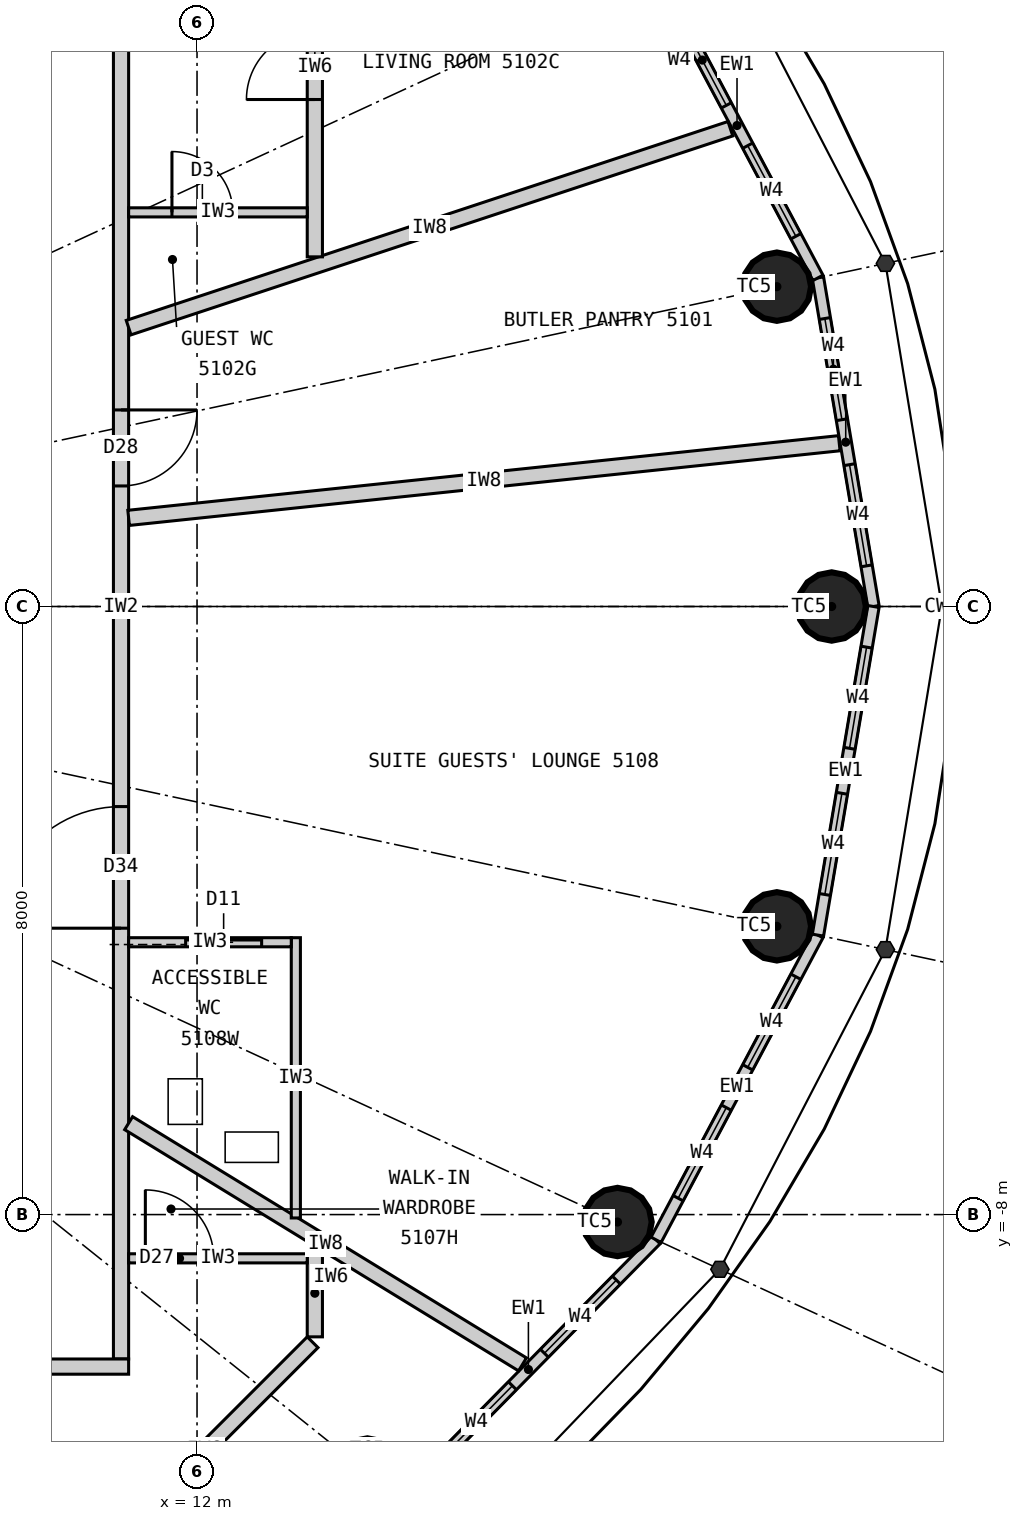
"""IFC4 building model, lengths in metres.
Left out: names, types, materials, properties, quantities, classifications, styles, units other than length and angle.
Written with IfcOpenShell. Run it as: python <this file> out.ifc"""

import sys

from ifc_helpers import new_model, si_unit, direction, frame, frame_2d, origin, origin_2d, place, context, subcontext, project, spatial, rectangle, circle, extrude, element, fill, save


model = new_model("IFC4")
c1 = context("Model", 3, precision=1e-05, world=origin(), true_north=direction((0.0, 1.0)))
c2 = subcontext(c1, "Body", "Model", "MODEL_VIEW")
j1 = project(units=[si_unit("LENGTHUNIT", "METRE"), si_unit("PLANEANGLEUNIT", "RADIAN")], contexts=[c1])
p1 = place(None, origin())
s1 = spatial("IfcSite", under=j1, at=p1, CompositionType="ELEMENT")
p2 = place(p1, origin())
s2 = spatial("IfcBuilding", under=s1, at=p2, CompositionType="ELEMENT")
p3 = place(p2, frame((0.0, 0.0, 192.9)))
s3 = spatial("IfcBuildingStorey", under=s2, at=p3, CompositionType="ELEMENT", Elevation=192.9)
for number, where, z_axis, x_axis in (
    (1, (20.35, 0.0, 0.0), (0.0, 0.0, 1.0), (1.0, 0.0, 0.0)),
    (2, (19.629, 4.208, 0.0), (0.0, 0.0, 1.0), (1.0, 0.0, 0.0)),
    (3, (14.241, -11.393, 0.0), (0.0, 0.0, 1.0), (1.0, 0.0, 0.0)),
    (4, (17.532, -8.098, 0.0), (0.0, 0.0, 1.0), (1.0, 0.0, 0.0)),
    (5, (19.629, -4.208, 0.0), (0.0, 0.0, 1.0), (1.0, 0.0, 0.0)),
):
    element("IfcColumn", number, at=place(p3, frame(where, z_axis=z_axis, x_axis=x_axis)), inside=s3, PredefinedType="COLUMN", context=c2, shape_type="SweptSolid", body=[
        extrude(circle(Radius=0.45, at=origin_2d()), origin(), (0.0, 0.0, 1.0), 3.3),
    ])
p4 = place(p3, frame((20.9, 0.0, 0.0), z_axis=(0.0, 0.0, 1.0), x_axis=(-0.166538513568, 0.986034950445, 0.0)))
e6 = element("IfcWall", 6, at=p4, inside=s3, PredefinedType="ELEMENTEDWALL", context=c2, shape_type="SweptSolid", body=[
    extrude(rectangle(XDim=4.385, YDim=0.15, at=frame_2d((2.192, 0.0))), origin(), (0.0, 0.0, 1.0), 3.12),
])
p5 = place(p4, frame((0.542, 0.0, 0.9)))
e7 = element("IfcOpeningElement", 7, at=p5, cuts=e6, PredefinedType="OPENING", context=c2, shape_type="SweptSolid", body=[
    extrude(rectangle(XDim=1.35, YDim=1.9, at=frame_2d((0.675, 0.95))), frame((0.0, 0.085, 0.0), z_axis=(0.0, -1.0, 0.0), x_axis=(1.0, 0.0, 0.0)), (0.0, 0.0, 1.0), 0.17),
])
p6 = place(p4, frame((2.492, 0.0, 0.9)))
e8 = element("IfcOpeningElement", 8, at=p6, cuts=e6, PredefinedType="OPENING", context=c2, shape_type="SweptSolid", body=[
    extrude(rectangle(XDim=1.35, YDim=1.9, at=frame_2d((0.675, 0.95))), frame((0.0, 0.085, 0.0), z_axis=(0.0, -1.0, 0.0), x_axis=(1.0, 0.0, 0.0)), (0.0, 0.0, 1.0), 0.17),
])
p7 = place(p3, frame((20.17, 4.323, 0.0), z_axis=(0.0, 0.0, 1.0), x_axis=(-0.469256152955, 0.883062094597, 0.0)))
e9 = element("IfcWall", 9, at=p7, inside=s3, PredefinedType="ELEMENTEDWALL", context=c2, shape_type="SweptSolid", body=[
    extrude(rectangle(XDim=4.539, YDim=0.15, at=frame_2d((2.27, 0.0))), origin(), (0.0, 0.0, 1.0), 3.12),
])
p8 = place(p7, frame((0.62, 0.0, 0.9)))
e10 = element("IfcOpeningElement", 10, at=p8, cuts=e9, PredefinedType="OPENING", context=c2, shape_type="SweptSolid", body=[
    extrude(rectangle(XDim=1.35, YDim=1.9, at=frame_2d((0.675, 0.95))), frame((0.0, 0.085, 0.0), z_axis=(0.0, -1.0, 0.0), x_axis=(1.0, 0.0, 0.0)), (0.0, 0.0, 1.0), 0.17),
])
p9 = place(p7, frame((2.57, 0.0, 0.9)))
e11 = element("IfcOpeningElement", 11, at=p9, cuts=e9, PredefinedType="OPENING", context=c2, shape_type="SweptSolid", body=[
    extrude(rectangle(XDim=1.35, YDim=1.9, at=frame_2d((0.675, 0.95))), frame((0.0, 0.085, 0.0), z_axis=(0.0, -1.0, 0.0), x_axis=(1.0, 0.0, 0.0)), (0.0, 0.0, 1.0), 0.17),
])
p10 = place(p3, frame((14.68, -11.744, 0.0), z_axis=(0.0, 0.0, 1.0), x_axis=(0.701527379618, 0.712642501993, 0.0)))
e12 = element("IfcWall", 12, at=p10, inside=s3, PredefinedType="ELEMENTEDWALL", context=c2, shape_type="SweptSolid", body=[
    extrude(rectangle(XDim=4.788, YDim=0.15, at=frame_2d((2.394, 0.0))), origin(), (0.0, 0.0, 1.0), 3.12),
])
p11 = place(p10, frame((0.744, 0.0, 0.9)))
e13 = element("IfcOpeningElement", 13, at=p11, cuts=e12, PredefinedType="OPENING", context=c2, shape_type="SweptSolid", body=[
    extrude(rectangle(XDim=1.35, YDim=1.9, at=frame_2d((0.675, 0.95))), frame((0.0, 0.085, 0.0), z_axis=(0.0, -1.0, 0.0), x_axis=(1.0, 0.0, 0.0)), (0.0, 0.0, 1.0), 0.17),
])
p12 = place(p10, frame((2.694, 0.0, 0.9)))
e14 = element("IfcOpeningElement", 14, at=p12, cuts=e12, PredefinedType="OPENING", context=c2, shape_type="SweptSolid", body=[
    extrude(rectangle(XDim=1.35, YDim=1.9, at=frame_2d((0.675, 0.95))), frame((0.0, 0.085, 0.0), z_axis=(0.0, -1.0, 0.0), x_axis=(1.0, 0.0, 0.0)), (0.0, 0.0, 1.0), 0.17),
])
p13 = place(p3, frame((18.04, -8.332, 0.0), z_axis=(0.0, 0.0, 1.0), x_axis=(0.469256152955, 0.883062094597, 0.0)))
e15 = element("IfcWall", 15, at=p13, inside=s3, PredefinedType="ELEMENTEDWALL", context=c2, shape_type="SweptSolid", body=[
    extrude(rectangle(XDim=4.539, YDim=0.15, at=frame_2d((2.27, 0.0))), origin(), (0.0, 0.0, 1.0), 3.12),
])
p14 = place(p13, frame((0.62, 0.0, 0.9)))
e16 = element("IfcOpeningElement", 16, at=p14, cuts=e15, PredefinedType="OPENING", context=c2, shape_type="SweptSolid", body=[
    extrude(rectangle(XDim=1.35, YDim=1.9, at=frame_2d((0.675, 0.95))), frame((0.0, 0.085, 0.0), z_axis=(0.0, -1.0, 0.0), x_axis=(1.0, 0.0, 0.0)), (0.0, 0.0, 1.0), 0.17),
])
p15 = place(p13, frame((2.57, 0.0, 0.9)))
e17 = element("IfcOpeningElement", 17, at=p15, cuts=e15, PredefinedType="OPENING", context=c2, shape_type="SweptSolid", body=[
    extrude(rectangle(XDim=1.35, YDim=1.9, at=frame_2d((0.675, 0.95))), frame((0.0, 0.085, 0.0), z_axis=(0.0, -1.0, 0.0), x_axis=(1.0, 0.0, 0.0)), (0.0, 0.0, 1.0), 0.17),
])
p16 = place(p3, frame((20.17, -4.323, 0.0), z_axis=(0.0, 0.0, 1.0), x_axis=(0.166538513568, 0.986034950445, 0.0)))
e18 = element("IfcWall", 18, at=p16, inside=s3, PredefinedType="ELEMENTEDWALL", context=c2, shape_type="SweptSolid", body=[
    extrude(rectangle(XDim=4.385, YDim=0.15, at=frame_2d((2.192, 0.0))), origin(), (0.0, 0.0, 1.0), 3.12),
])
p17 = place(p16, frame((0.542, 0.0, 0.9)))
e19 = element("IfcOpeningElement", 19, at=p17, cuts=e18, PredefinedType="OPENING", context=c2, shape_type="SweptSolid", body=[
    extrude(rectangle(XDim=1.35, YDim=1.9, at=frame_2d((0.675, 0.95))), frame((0.0, 0.085, 0.0), z_axis=(0.0, -1.0, 0.0), x_axis=(1.0, 0.0, 0.0)), (0.0, 0.0, 1.0), 0.17),
])
p18 = place(p16, frame((2.492, 0.0, 0.9)))
e20 = element("IfcOpeningElement", 20, at=p18, cuts=e18, PredefinedType="OPENING", context=c2, shape_type="SweptSolid", body=[
    extrude(rectangle(XDim=1.35, YDim=1.9, at=frame_2d((0.675, 0.95))), frame((0.0, 0.085, 0.0), z_axis=(0.0, -1.0, 0.0), x_axis=(1.0, 0.0, 0.0)), (0.0, 0.0, 1.0), 0.17),
])
p19 = place(p3, frame((11.0, -9.9, 0.0), z_axis=(0.0, 0.0, 1.0), x_axis=(0.0, 1.0, 0.0)))
e21 = element("IfcWall", 21, at=p19, inside=s3, PredefinedType="PARTITIONING", context=c2, shape_type="SweptSolid", body=[
    extrude(rectangle(XDim=19.8, YDim=0.2, at=frame_2d((9.9, 0.0))), origin(), (0.0, 0.0, 1.0), 3.12),
])
p20 = place(p19, frame((11.486, 0.0, 0.0)))
e22 = element("IfcOpeningElement", 22, at=p20, cuts=e21, PredefinedType="OPENING", context=c2, shape_type="SweptSolid", body=[
    extrude(rectangle(XDim=1.0, YDim=2.2, at=frame_2d((0.5, 1.1))), frame((0.0, 0.11, 0.0), z_axis=(0.0, -1.0, 0.0), x_axis=(1.0, 0.0, 0.0)), (0.0, 0.0, 1.0), 0.22),
])
p21 = place(p19, frame((18.645, 0.0, 0.0)))
e23 = element("IfcOpeningElement", 23, at=p21, cuts=e21, PredefinedType="OPENING", context=c2, shape_type="SweptSolid", body=[
    extrude(rectangle(XDim=1.0, YDim=2.2, at=frame_2d((0.5, 1.1))), frame((0.0, 0.11, 0.0), z_axis=(0.0, -1.0, 0.0), x_axis=(1.0, 0.0, 0.0)), (0.0, 0.0, 1.0), 0.22),
])
p22 = place(p19, frame((5.668, 0.0, 0.0)))
e24 = element("IfcOpeningElement", 24, at=p22, cuts=e21, PredefinedType="OPENING", context=c2, shape_type="SweptSolid", body=[
    extrude(rectangle(XDim=1.6, YDim=2.2, at=frame_2d((0.8, 1.1))), frame((0.0, 0.11, 0.0), z_axis=(0.0, -1.0, 0.0), x_axis=(1.0, 0.0, 0.0)), (0.0, 0.0, 1.0), 0.22),
])
p23 = place(p3, frame((11.1, -10.0, 0.0), z_axis=(0.0, 0.0, 1.0), x_axis=(-1.0, 0.0, 0.0)))
e25 = element("IfcWall", 25, at=p23, inside=s3, PredefinedType="PARTITIONING", context=c2, shape_type="SweptSolid", body=[
    extrude(rectangle(XDim=22.2, YDim=0.2, at=frame_2d((11.1, 0.0))), origin(), (0.0, 0.0, 1.0), 3.12),
])
p24 = place(p23, frame((18.864, 0.0, 0.0)))
e26 = element("IfcOpeningElement", 26, at=p24, cuts=e25, PredefinedType="OPENING", context=c2, shape_type="SweptSolid", body=[
    extrude(rectangle(XDim=1.0, YDim=2.2, at=frame_2d((0.5, 1.1))), frame((0.0, 0.11, 0.0), z_axis=(0.0, -1.0, 0.0), x_axis=(1.0, 0.0, 0.0)), (0.0, 0.0, 1.0), 0.22),
])
p25 = place(p23, frame((2.309, 0.0, 0.0)))
e27 = element("IfcOpeningElement", 27, at=p25, cuts=e25, PredefinedType="OPENING", context=c2, shape_type="SweptSolid", body=[
    extrude(rectangle(XDim=1.0, YDim=2.2, at=frame_2d((0.5, 1.1))), frame((0.0, 0.11, 0.0), z_axis=(0.0, -1.0, 0.0), x_axis=(1.0, 0.0, 0.0)), (0.0, 0.0, 1.0), 0.22),
])
p26 = place(p3, frame((11.1, 1.166, 0.0), z_axis=(0.0, 0.0, 1.0), x_axis=(0.994527487125, 0.104475247564, 0.0)))
e28 = element("IfcWall", 28, at=p26, inside=s3, PredefinedType="PARTITIONING", context=c2, shape_type="SweptSolid", body=[
    extrude(rectangle(XDim=9.401, YDim=0.2, at=frame_2d((4.701, 0.0))), origin(), (0.0, 0.0, 1.0), 2.37),
])
p27 = place(p3, frame((11.1, 3.669, 0.0), z_axis=(0.0, 0.0, 1.0), x_axis=(0.949476668397, 0.313837627079, 0.0)))
e29 = element("IfcWall", 29, at=p27, inside=s3, PredefinedType="PARTITIONING", context=c2, shape_type="SweptSolid", body=[
    extrude(rectangle(XDim=8.339, YDim=0.2, at=frame_2d((4.169, 0.0))), origin(), (0.0, 0.0, 1.0), 3.12),
])
p28 = place(p3, frame((11.1, -6.797, 0.0), z_axis=(0.0, 0.0, 1.0), x_axis=(0.852799818179, -0.522237943963, 0.0)))
e30 = element("IfcWall", 30, at=p28, inside=s3, PredefinedType="PARTITIONING", context=c2, shape_type="SweptSolid", body=[
    extrude(rectangle(XDim=6.077, YDim=0.2, at=frame_2d((3.039, 0.0))), origin(), (0.0, 0.0, 1.0), 3.12),
])
p29 = place(p3, frame((13.55, 4.6, 0.0), z_axis=(0.0, 0.0, 1.0), x_axis=(0.0, 1.0, 0.0)))
e31 = element("IfcWall", 31, at=p29, inside=s3, PredefinedType="PARTITIONING", context=c2, shape_type="SweptSolid", body=[
    extrude(rectangle(XDim=5.009, YDim=0.2, at=frame_2d((2.504, 0.0))), origin(), (0.0, 0.0, 1.0), 3.12),
])
p30 = place(p29, frame((2.07, 0.0, 0.0)))
e32 = element("IfcOpeningElement", 32, at=p30, cuts=e31, PredefinedType="OPENING", context=c2, shape_type="SweptSolid", body=[
    extrude(rectangle(XDim=0.9, YDim=2.1, at=frame_2d((0.45, 1.05))), frame((0.0, 0.11, 0.0), z_axis=(0.0, -1.0, 0.0), x_axis=(1.0, 0.0, 0.0)), (0.0, 0.0, 1.0), 0.22),
])
p31 = place(p3, frame((11.1, 5.185, 0.0), z_axis=(0.0, 0.0, 1.0), x_axis=(1.0, 0.0, 0.0)))
e33 = element("IfcWall", 33, at=p31, inside=s3, PredefinedType="PARTITIONING", context=c2, shape_type="SweptSolid", body=[
    extrude(rectangle(XDim=2.35, YDim=0.12, at=frame_2d((1.175, 0.0))), origin(), (0.0, 0.0, 1.0), 3.12),
])
p32 = place(p31, frame((0.57, 0.0, 0.0)))
e34 = element("IfcOpeningElement", 34, at=p32, cuts=e33, PredefinedType="OPENING", context=c2, shape_type="SweptSolid", body=[
    extrude(rectangle(XDim=0.8, YDim=2.1, at=frame_2d((0.4, 1.05))), frame((0.0, 0.07, 0.0), z_axis=(0.0, -1.0, 0.0), x_axis=(1.0, 0.0, 0.0)), (0.0, 0.0, 1.0), 0.14),
])
p33 = place(p3, frame((10.679, -12.521, 0.0), z_axis=(0.0, 0.0, 1.0), x_axis=(0.707106781187, 0.707106781187, 0.0)))
e35 = element("IfcWall", 35, at=p33, inside=s3, PredefinedType="PARTITIONING", context=c2, shape_type="SweptSolid", body=[
    extrude(rectangle(XDim=4.019, YDim=0.2, at=frame_2d((2.009, 0.0))), origin(), (0.0, 0.0, 1.0), 3.12),
])
p34 = place(p3, frame((13.55, -9.609, 0.0), z_axis=(0.0, 0.0, 1.0), x_axis=(0.0, 1.0, 0.0)))
e36 = element("IfcWall", 36, at=p34, inside=s3, PredefinedType="PARTITIONING", context=c2, shape_type="SweptSolid", body=[
    extrude(rectangle(XDim=1.148, YDim=0.2, at=frame_2d((0.574, 0.0))), origin(), (0.0, 0.0, 1.0), 3.12),
])
p35 = place(p3, frame((11.1, -8.576, 0.0), z_axis=(0.0, 0.0, 1.0), x_axis=(1.0, 0.0, 0.0)))
e37 = element("IfcWall", 37, at=p35, inside=s3, PredefinedType="PARTITIONING", context=c2, shape_type="SweptSolid", body=[
    extrude(rectangle(XDim=2.35, YDim=0.12, at=frame_2d((1.175, 0.0))), origin(), (0.0, 0.0, 1.0), 3.12),
])
p36 = place(p35, frame((0.22, 0.0, 0.0)))
e38 = element("IfcOpeningElement", 38, at=p36, cuts=e37, PredefinedType="OPENING", context=c2, shape_type="SweptSolid", body=[
    extrude(rectangle(XDim=0.9, YDim=2.1, at=frame_2d((0.45, 1.05))), frame((0.0, 0.07, 0.0), z_axis=(0.0, -1.0, 0.0), x_axis=(1.0, 0.0, 0.0)), (0.0, 0.0, 1.0), 0.14),
])
p37 = place(p3, frame((13.3, -8.044, 0.0), z_axis=(0.0, 0.0, 1.0), x_axis=(0.0, 1.0, 0.0)))
e39 = element("IfcWall", 39, at=p37, inside=s3, PredefinedType="PARTITIONING", context=c2, shape_type="SweptSolid", body=[
    extrude(rectangle(XDim=3.687, YDim=0.12, at=frame_2d((1.844, 0.0))), origin(), (0.0, 0.0, 1.0), 3.12),
])
p38 = place(p3, frame((11.1, -4.417, 0.0), z_axis=(0.0, 0.0, 1.0), x_axis=(1.0, 0.0, 0.0)))
e40 = element("IfcWall", 40, at=p38, inside=s3, PredefinedType="PARTITIONING", context=c2, shape_type="SweptSolid", body=[
    extrude(rectangle(XDim=2.14, YDim=0.12, at=frame_2d((1.07, 0.0))), origin(), (0.0, 0.0, 1.0), 2.37),
])
p39 = place(p38, frame((0.75, 0.0, 0.0)))
e41 = element("IfcOpeningElement", 41, at=p39, cuts=e40, PredefinedType="OPENING", context=c2, shape_type="SweptSolid", body=[
    extrude(rectangle(XDim=1.0, YDim=2.2, at=frame_2d((0.5, 1.1))), frame((0.0, 0.07, 0.0), z_axis=(0.0, -1.0, 0.0), x_axis=(1.0, 0.0, 0.0)), (0.0, 0.0, 1.0), 0.14),
])
p40 = place(p5, origin())
e42 = element("IfcWindow", 42, at=p40, inside=s3, PartitioningType="SINGLE_PANEL", PredefinedType="WINDOW", context=c2, shape_type="SweptSolid", body=[
    extrude(rectangle(XDim=1.35, YDim=1.9, at=frame_2d((0.675, 0.95))), frame((0.0, 0.03, 0.0), z_axis=(0.0, -1.0, 0.0), x_axis=(1.0, 0.0, 0.0)), (0.0, 0.0, 1.0), 0.06),
])
fill(e7, e42)
p41 = place(p6, origin())
e43 = element("IfcWindow", 43, at=p41, inside=s3, PartitioningType="SINGLE_PANEL", PredefinedType="WINDOW", context=c2, shape_type="SweptSolid", body=[
    extrude(rectangle(XDim=1.35, YDim=1.9, at=frame_2d((0.675, 0.95))), frame((0.0, 0.03, 0.0), z_axis=(0.0, -1.0, 0.0), x_axis=(1.0, 0.0, 0.0)), (0.0, 0.0, 1.0), 0.06),
])
fill(e8, e43)
p42 = place(p8, origin())
e44 = element("IfcWindow", 44, at=p42, inside=s3, PartitioningType="SINGLE_PANEL", PredefinedType="WINDOW", context=c2, shape_type="SweptSolid", body=[
    extrude(rectangle(XDim=1.35, YDim=1.9, at=frame_2d((0.675, 0.95))), frame((0.0, 0.03, 0.0), z_axis=(0.0, -1.0, 0.0), x_axis=(1.0, 0.0, 0.0)), (0.0, 0.0, 1.0), 0.06),
])
fill(e10, e44)
p43 = place(p9, origin())
e45 = element("IfcWindow", 45, at=p43, inside=s3, PartitioningType="SINGLE_PANEL", PredefinedType="WINDOW", context=c2, shape_type="SweptSolid", body=[
    extrude(rectangle(XDim=1.35, YDim=1.9, at=frame_2d((0.675, 0.95))), frame((0.0, 0.03, 0.0), z_axis=(0.0, -1.0, 0.0), x_axis=(1.0, 0.0, 0.0)), (0.0, 0.0, 1.0), 0.06),
])
fill(e11, e45)
p44 = place(p11, origin())
e46 = element("IfcWindow", 46, at=p44, inside=s3, PartitioningType="SINGLE_PANEL", PredefinedType="WINDOW", context=c2, shape_type="SweptSolid", body=[
    extrude(rectangle(XDim=1.35, YDim=1.9, at=frame_2d((0.675, 0.95))), frame((0.0, 0.03, 0.0), z_axis=(0.0, -1.0, 0.0), x_axis=(1.0, 0.0, 0.0)), (0.0, 0.0, 1.0), 0.06),
])
fill(e13, e46)
p45 = place(p12, origin())
e47 = element("IfcWindow", 47, at=p45, inside=s3, PartitioningType="SINGLE_PANEL", PredefinedType="WINDOW", context=c2, shape_type="SweptSolid", body=[
    extrude(rectangle(XDim=1.35, YDim=1.9, at=frame_2d((0.675, 0.95))), frame((0.0, 0.03, 0.0), z_axis=(0.0, -1.0, 0.0), x_axis=(1.0, 0.0, 0.0)), (0.0, 0.0, 1.0), 0.06),
])
fill(e14, e47)
p46 = place(p14, origin())
e48 = element("IfcWindow", 48, at=p46, inside=s3, PartitioningType="SINGLE_PANEL", PredefinedType="WINDOW", context=c2, shape_type="SweptSolid", body=[
    extrude(rectangle(XDim=1.35, YDim=1.9, at=frame_2d((0.675, 0.95))), frame((0.0, 0.03, 0.0), z_axis=(0.0, -1.0, 0.0), x_axis=(1.0, 0.0, 0.0)), (0.0, 0.0, 1.0), 0.06),
])
fill(e16, e48)
p47 = place(p15, origin())
e49 = element("IfcWindow", 49, at=p47, inside=s3, PartitioningType="SINGLE_PANEL", PredefinedType="WINDOW", context=c2, shape_type="SweptSolid", body=[
    extrude(rectangle(XDim=1.35, YDim=1.9, at=frame_2d((0.675, 0.95))), frame((0.0, 0.03, 0.0), z_axis=(0.0, -1.0, 0.0), x_axis=(1.0, 0.0, 0.0)), (0.0, 0.0, 1.0), 0.06),
])
fill(e17, e49)
p48 = place(p17, origin())
e50 = element("IfcWindow", 50, at=p48, inside=s3, PartitioningType="SINGLE_PANEL", PredefinedType="WINDOW", context=c2, shape_type="SweptSolid", body=[
    extrude(rectangle(XDim=1.35, YDim=1.9, at=frame_2d((0.675, 0.95))), frame((0.0, 0.03, 0.0), z_axis=(0.0, -1.0, 0.0), x_axis=(1.0, 0.0, 0.0)), (0.0, 0.0, 1.0), 0.06),
])
fill(e19, e50)
p49 = place(p18, origin())
e51 = element("IfcWindow", 51, at=p49, inside=s3, PartitioningType="SINGLE_PANEL", PredefinedType="WINDOW", context=c2, shape_type="SweptSolid", body=[
    extrude(rectangle(XDim=1.35, YDim=1.9, at=frame_2d((0.675, 0.95))), frame((0.0, 0.03, 0.0), z_axis=(0.0, -1.0, 0.0), x_axis=(1.0, 0.0, 0.0)), (0.0, 0.0, 1.0), 0.06),
])
fill(e20, e51)
p50 = place(p20, origin())
e52 = element("IfcDoor", 52, at=p50, inside=s3, OperationType="SINGLE_SWING_RIGHT", PredefinedType="DOOR", context=c2, shape_type="SweptSolid", body=[
    extrude(rectangle(XDim=1.0, YDim=2.2, at=frame_2d((0.5, 1.1))), frame((0.0, 0.025, 0.0), z_axis=(0.0, -1.0, 0.0), x_axis=(1.0, 0.0, 0.0)), (0.0, 0.0, 1.0), 0.05),
])
fill(e22, e52)
p51 = place(p32, origin())
e53 = element("IfcDoor", 53, at=p51, inside=s3, OperationType="SINGLE_SWING_LEFT", PredefinedType="DOOR", context=c2, shape_type="SweptSolid", body=[
    extrude(rectangle(XDim=0.8, YDim=2.1, at=frame_2d((0.4, 1.05))), frame((0.0, 0.025, 0.0), z_axis=(0.0, -1.0, 0.0), x_axis=(1.0, 0.0, 0.0)), (0.0, 0.0, 1.0), 0.05),
])
fill(e34, e53)
p52 = place(p30, origin())
e54 = element("IfcDoor", 54, at=p52, inside=s3, OperationType="SINGLE_SWING_LEFT", PredefinedType="DOOR", context=c2, shape_type="SweptSolid", body=[
    extrude(rectangle(XDim=0.9, YDim=2.1, at=frame_2d((0.45, 1.05))), frame((0.0, 0.025, 0.0), z_axis=(0.0, -1.0, 0.0), x_axis=(1.0, 0.0, 0.0)), (0.0, 0.0, 1.0), 0.05),
])
fill(e32, e54)
p53 = place(p36, origin())
e55 = element("IfcDoor", 55, at=p53, inside=s3, OperationType="SINGLE_SWING_LEFT", PredefinedType="DOOR", context=c2, shape_type="SweptSolid", body=[
    extrude(rectangle(XDim=0.9, YDim=2.1, at=frame_2d((0.45, 1.05))), frame((0.0, 0.025, 0.0), z_axis=(0.0, -1.0, 0.0), x_axis=(1.0, 0.0, 0.0)), (0.0, 0.0, 1.0), 0.05),
])
fill(e38, e55)
p54 = place(p39, origin())
e56 = element("IfcDoor", 56, at=p54, inside=s3, OperationType="SLIDING_TO_LEFT", PredefinedType="DOOR", context=c2, shape_type="SweptSolid", body=[
    extrude(rectangle(XDim=1.0, YDim=2.2, at=frame_2d((0.5, 1.1))), frame((0.0, 0.025, 0.0), z_axis=(0.0, -1.0, 0.0), x_axis=(1.0, 0.0, 0.0)), (0.0, 0.0, 1.0), 0.05),
])
fill(e41, e56)
p55 = place(p22, origin())
e57 = element("IfcDoor", 57, at=p55, inside=s3, OperationType="DOUBLE_DOOR_DOUBLE_SWING", PredefinedType="DOOR", context=c2, shape_type="SweptSolid", body=[
    extrude(rectangle(XDim=1.6, YDim=2.2, at=frame_2d((0.8, 1.1))), frame((0.0, 0.025, 0.0), z_axis=(0.0, -1.0, 0.0), x_axis=(1.0, 0.0, 0.0)), (0.0, 0.0, 1.0), 0.05),
])
fill(e24, e57)
save(model, sys.argv[1])
